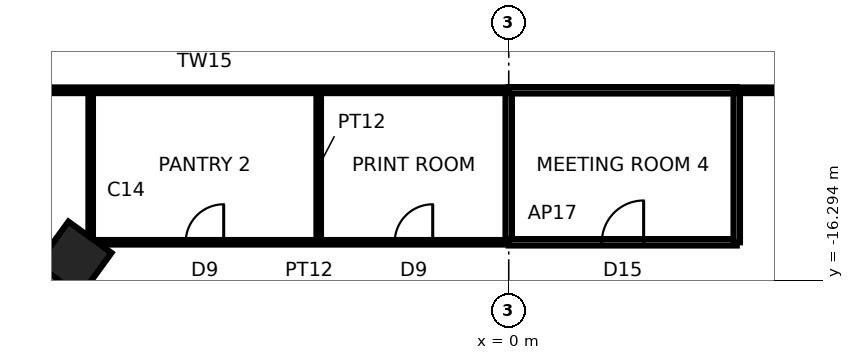
"""IFC4 building model, lengths in metres.
Left out: names, types, materials, properties, quantities, classifications, styles, units other than length and angle.
Written with IfcOpenShell. Run it as: python <this file> out.ifc"""

import sys

from ifc_helpers import new_model, si_unit, direction, frame, frame_2d, origin, origin_2d, place, context, subcontext, project, spatial, rectangle, extrude, element, fill, save


model = new_model("IFC4")
c1 = context("Model", 3, precision=1e-05, world=origin(), true_north=direction((0.0, 1.0)))
c2 = subcontext(c1, "Body", "Model", "MODEL_VIEW")
j1 = project(units=[si_unit("LENGTHUNIT", "METRE"), si_unit("PLANEANGLEUNIT", "RADIAN")], contexts=[c1])
p1 = place(None, origin())
s1 = spatial("IfcSite", under=j1, at=p1, CompositionType="ELEMENT")
p2 = place(p1, origin())
s2 = spatial("IfcBuilding", under=s1, at=p2, CompositionType="ELEMENT")
p3 = place(p2, frame((0.0, 0.0, 195.5)))
s3 = spatial("IfcBuildingStorey", under=s2, at=p3, CompositionType="ELEMENT", Elevation=195.5)
p4 = place(p3, frame((-11.43, -15.733, 0.0), z_axis=(0.0, 0.0, 1.0), x_axis=(-0.587785252292, -0.809016994375, 0.0)))
e1 = element("IfcColumn", 1, at=p4, inside=s3, PredefinedType="COLUMN", context=c2, shape_type="SweptSolid", body=[
    extrude(rectangle(XDim=1.4, YDim=1.4, at=origin_2d()), origin(), (0.0, 0.0, 1.0), 3.9),
])
p5 = place(p3, frame((-11.0, -11.3, 0.0), z_axis=(0.0, 0.0, 1.0), x_axis=(0.0, -1.0, 0.0)))
e2 = element("IfcWall", 2, at=p5, inside=s3, PredefinedType="PARTITIONING", context=c2, shape_type="SweptSolid", body=[
    extrude(rectangle(XDim=4.0, YDim=0.12, at=frame_2d((2.0, 0.0))), origin(), (0.0, 0.0, 1.0), 3.74),
])
p6 = place(p3, frame((-16.0, -11.3, 0.0), z_axis=(0.0, 0.0, 1.0), x_axis=(1.0, 0.0, 0.0)))
e3 = element("IfcWall", 3, at=p6, inside=s3, PredefinedType="PARTITIONING", context=c2, shape_type="SweptSolid", body=[
    extrude(rectangle(XDim=16.0, YDim=0.15, at=frame_2d((8.0, 0.0))), origin(), (0.0, 0.0, 1.0), 3.74),
])
p7 = place(p3, frame((-5.0, -11.3, 0.0), z_axis=(0.0, 0.0, 1.0), x_axis=(0.0, -1.0, 0.0)))
e4 = element("IfcWall", 4, at=p7, inside=s3, PredefinedType="PARTITIONING", context=c2, shape_type="SweptSolid", body=[
    extrude(rectangle(XDim=4.0, YDim=0.12, at=frame_2d((2.0, 0.0))), origin(), (0.0, 0.0, 1.0), 3.74),
])
p8 = place(p3, frame((-11.0, -15.3, 0.0), z_axis=(0.0, 0.0, 1.0), x_axis=(1.0, 0.0, 0.0)))
e5 = element("IfcWall", 5, at=p8, inside=s3, PredefinedType="PARTITIONING", context=c2, shape_type="SweptSolid", body=[
    extrude(rectangle(XDim=11.0, YDim=0.12, at=frame_2d((5.5, 0.0))), origin(), (0.0, 0.0, 1.0), 3.334),
])
p9 = place(p8, frame((2.5, 0.0, 0.0)))
e6 = element("IfcOpeningElement", 6, at=p9, cuts=e5, PredefinedType="OPENING", context=c2, shape_type="SweptSolid", body=[
    extrude(rectangle(XDim=1.0, YDim=2.4, at=frame_2d((0.5, 1.2))), frame((0.0, 0.07, 0.0), z_axis=(0.0, -1.0, 0.0), x_axis=(1.0, 0.0, 0.0)), (0.0, 0.0, 1.0), 0.14),
])
p10 = place(p8, frame((8.0, 0.0, 0.0)))
e7 = element("IfcOpeningElement", 7, at=p10, cuts=e5, PredefinedType="OPENING", context=c2, shape_type="SweptSolid", body=[
    extrude(rectangle(XDim=1.0, YDim=2.4, at=frame_2d((0.5, 1.2))), frame((0.0, 0.07, 0.0), z_axis=(0.0, -1.0, 0.0), x_axis=(1.0, 0.0, 0.0)), (0.0, 0.0, 1.0), 0.14),
])
p11 = place(p3, frame((0.0, -15.3, 0.0), z_axis=(0.0, 0.0, 1.0), x_axis=(0.0, 1.0, 0.0)))
e8 = element("IfcWall", 8, at=p11, inside=s3, PredefinedType="PARTITIONING", context=c2, shape_type="SweptSolid", body=[
    extrude(rectangle(XDim=4.0, YDim=0.17, at=frame_2d((2.0, 0.0))), origin(), (0.0, 0.0, 1.0), 3.04),
])
p12 = place(p3, frame((0.0, -15.3, 0.0), z_axis=(0.0, 0.0, 1.0), x_axis=(1.0, 0.0, 0.0)))
e9 = element("IfcWall", 9, at=p12, inside=s3, PredefinedType="PARTITIONING", context=c2, shape_type="SweptSolid", body=[
    extrude(rectangle(XDim=6.0, YDim=0.17, at=frame_2d((3.0, 0.0))), origin(), (0.0, 0.0, 1.0), 3.334),
])
p13 = place(p12, frame((2.45, 0.0, 0.0)))
e10 = element("IfcOpeningElement", 10, at=p13, cuts=e9, PredefinedType="OPENING", context=c2, shape_type="SweptSolid", body=[
    extrude(rectangle(XDim=1.1, YDim=2.4, at=frame_2d((0.55, 1.2))), frame((0.0, 0.095, 0.0), z_axis=(0.0, -1.0, 0.0), x_axis=(1.0, 0.0, 0.0)), (0.0, 0.0, 1.0), 0.19),
])
p14 = place(p3, frame((6.0, -11.3, 0.0), z_axis=(0.0, 0.0, 1.0), x_axis=(-1.0, 0.0, 0.0)))
e11 = element("IfcWall", 11, at=p14, inside=s3, PredefinedType="PARTITIONING", context=c2, shape_type="SweptSolid", body=[
    extrude(rectangle(XDim=6.0, YDim=0.17, at=frame_2d((3.0, 0.0))), origin(), (0.0, 0.0, 1.0), 3.74),
])
p15 = place(p3, frame((6.0, -15.3, 0.0), z_axis=(0.0, 0.0, 1.0), x_axis=(0.0, 1.0, 0.0)))
e12 = element("IfcWall", 12, at=p15, inside=s3, PredefinedType="PARTITIONING", context=c2, shape_type="SweptSolid", body=[
    extrude(rectangle(XDim=4.0, YDim=0.17, at=frame_2d((2.0, 0.0))), origin(), (0.0, 0.0, 1.0), 3.74),
])
p16 = place(p3, frame((6.0, -11.3, 0.0), z_axis=(0.0, 0.0, 1.0), x_axis=(1.0, 0.0, 0.0)))
e13 = element("IfcWall", 13, at=p16, inside=s3, PredefinedType="PARTITIONING", context=c2, shape_type="SweptSolid", body=[
    extrude(rectangle(XDim=10.0, YDim=0.15, at=frame_2d((5.0, 0.0))), origin(), (0.0, 0.0, 1.0), 3.74),
])
p17 = place(p9, origin())
e14 = element("IfcDoor", 14, at=p17, inside=s3, OperationType="SINGLE_SWING_RIGHT", PredefinedType="DOOR", context=c2, shape_type="SweptSolid", body=[
    extrude(rectangle(XDim=1.0, YDim=2.4, at=frame_2d((0.5, 1.2))), frame((0.0, 0.025, 0.0), z_axis=(0.0, -1.0, 0.0), x_axis=(1.0, 0.0, 0.0)), (0.0, 0.0, 1.0), 0.05),
])
fill(e6, e14)
p18 = place(p13, origin())
e15 = element("IfcDoor", 15, at=p18, inside=s3, OperationType="SINGLE_SWING_RIGHT", PredefinedType="DOOR", context=c2, shape_type="SweptSolid", body=[
    extrude(rectangle(XDim=1.1, YDim=2.4, at=frame_2d((0.55, 1.2))), frame((0.0, 0.025, 0.0), z_axis=(0.0, -1.0, 0.0), x_axis=(1.0, 0.0, 0.0)), (0.0, 0.0, 1.0), 0.05),
])
fill(e10, e15)
p19 = place(p10, origin())
e16 = element("IfcDoor", 16, at=p19, inside=s3, OperationType="SINGLE_SWING_RIGHT", PredefinedType="DOOR", context=c2, shape_type="SweptSolid", body=[
    extrude(rectangle(XDim=1.0, YDim=2.4, at=frame_2d((0.5, 1.2))), frame((0.0, 0.025, 0.0), z_axis=(0.0, -1.0, 0.0), x_axis=(1.0, 0.0, 0.0)), (0.0, 0.0, 1.0), 0.05),
])
fill(e7, e16)
save(model, sys.argv[1])
